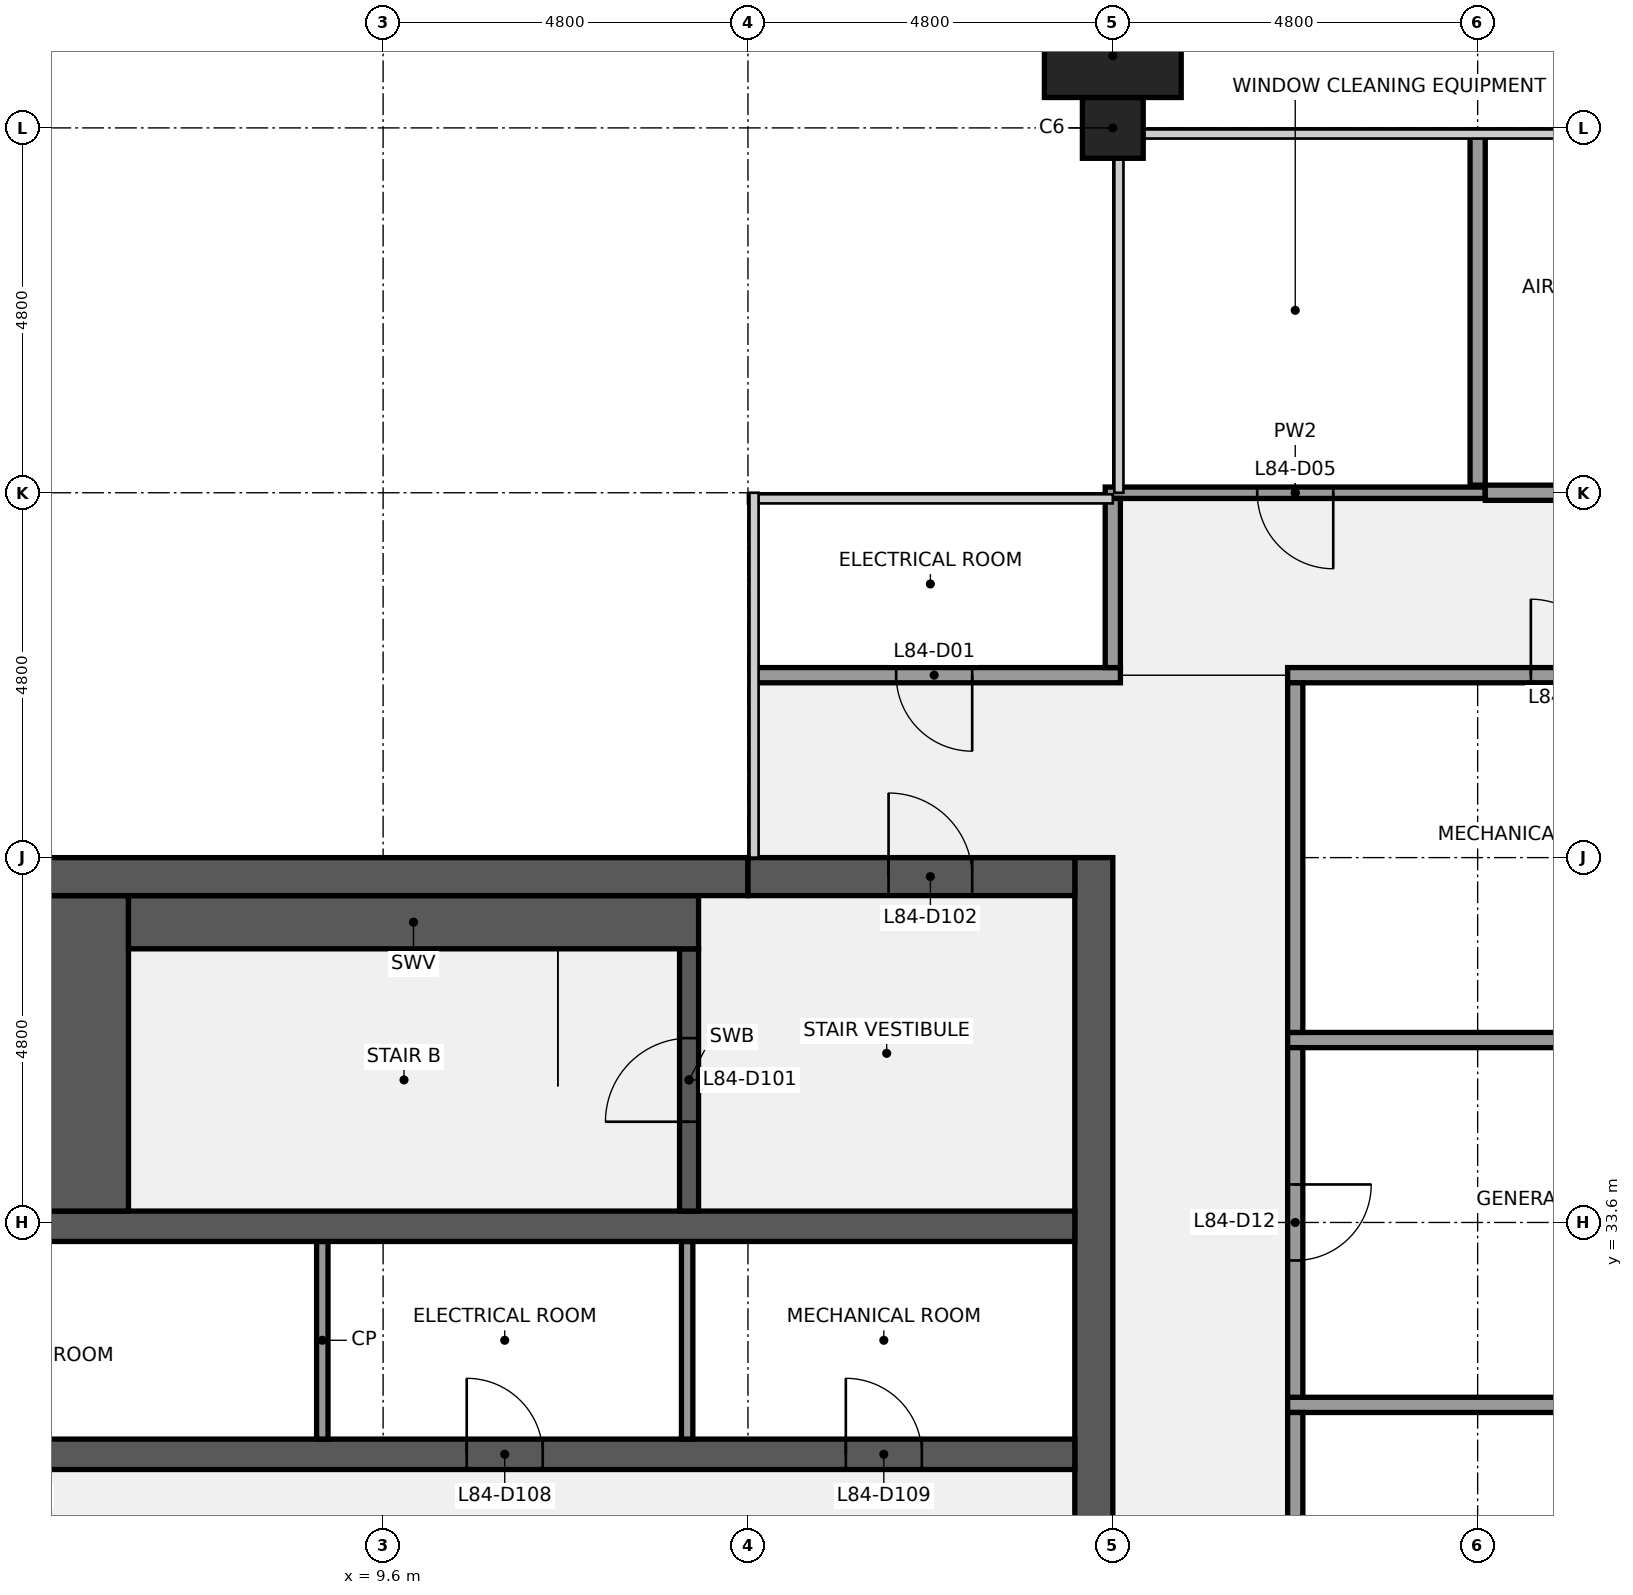
"""IFC4 building model, lengths in metres.
Left out: names, types, materials, properties, quantities, classifications, styles, units other than length and angle.
Written with IfcOpenShell. Run it as: python <this file> out.ifc"""

import sys

from ifc_helpers import new_model, si_unit, direction, frame, frame_2d, origin, origin_2d, place, context, subcontext, project, spatial, polyline, rectangle, outline, extrude, element, fill, save


model = new_model("IFC4")
c1 = context("Model", 3, precision=1e-05, world=origin(), true_north=direction((0.0, 1.0)))
c2 = subcontext(c1, "Body", "Model", "MODEL_VIEW")
j1 = project(units=[si_unit("LENGTHUNIT", "METRE"), si_unit("PLANEANGLEUNIT", "RADIAN")], contexts=[c1])
p1 = place(None, origin())
s1 = spatial("IfcSite", under=j1, at=p1, CompositionType="ELEMENT")
p2 = place(p1, origin())
s2 = spatial("IfcBuilding", under=s1, at=p2, CompositionType="ELEMENT")
p3 = place(p2, frame((0.0, 0.0, 374.3)))
s3 = spatial("IfcBuildingStorey", under=s2, at=p3, CompositionType="ELEMENT", Elevation=374.3)
p4 = place(p3, frame((19.2, 48.0, 0.0), z_axis=(0.0, 0.0, 1.0), x_axis=(1.0, 0.0, 0.0)))
e1 = element("IfcColumn", 1, at=p4, inside=s3, PredefinedType="COLUMN", context=c2, shape_type="SweptSolid", body=[
    extrude(rectangle(XDim=0.8, YDim=0.8, at=origin_2d()), origin(), (0.0, 0.0, 1.0), 4.0),
])
p5 = place(p3, frame((18.95, 38.4, 0.0), z_axis=(0.0, 0.0, 1.0), x_axis=(0.0, -1.0, 0.0)))
e2 = element("IfcWall", 2, at=p5, inside=s3, PredefinedType="SHEAR", context=c2, shape_type="SweptSolid", body=[
    extrude(outline(polyline([(0.0, 0.0), (24.276, 0.0), (24.277, 2.488), (0.0, 27.067), (0.0, 0.0)])), frame((0.0, 0.25, 0.0), z_axis=(0.0, -1.0, 0.0), x_axis=(1.0, 0.0, 0.0)), (0.0, 0.0, 1.0), 0.5),
])
p6 = place(p5, frame((18.3, 0.0, 0.0)))
e3 = element("IfcOpeningElement", 3, at=p6, cuts=e2, PredefinedType="OPENING", context=c2, shape_type="SweptSolid", body=[
    extrude(rectangle(XDim=1.8, YDim=2.1, at=frame_2d((0.9, 1.05))), frame((0.0, 0.26, 0.0), z_axis=(0.0, -1.0, 0.0), x_axis=(1.0, 0.0, 0.0)), (0.0, 0.0, 1.0), 0.52),
])
p7 = place(p5, frame((8.7, 0.0, 0.0)))
e4 = element("IfcOpeningElement", 4, at=p7, cuts=e2, PredefinedType="OPENING", context=c2, shape_type="SweptSolid", body=[
    extrude(rectangle(XDim=1.8, YDim=2.1, at=frame_2d((0.9, 1.05))), frame((0.0, 0.26, 0.0), z_axis=(0.0, -1.0, 0.0), x_axis=(1.0, 0.0, 0.0)), (0.0, 0.0, 1.0), 0.52),
])
p8 = place(p3, frame((0.5, 30.55, 0.0), z_axis=(0.0, 0.0, 1.0), x_axis=(1.0, 0.0, 0.0)))
e5 = element("IfcWall", 5, at=p8, inside=s3, PredefinedType="SHEAR", context=c2, shape_type="SweptSolid", body=[
    extrude(outline(polyline([(0.0, 0.0), (18.2, 0.0), (18.2, 19.119), (0.0, 19.119), (0.0, 0.0)])), frame((0.0, 0.2, 0.0), z_axis=(0.0, -1.0, 0.0), x_axis=(1.0, 0.0, 0.0)), (0.0, 0.0, 1.0), 0.4),
])
p9 = place(p8, frame((3.613, 0.0, 0.0)))
e6 = element("IfcOpeningElement", 6, at=p9, cuts=e5, PredefinedType="OPENING", context=c2, shape_type="SweptSolid", body=[
    extrude(rectangle(XDim=1.0, YDim=2.1, at=frame_2d((0.5, 1.05))), frame((0.0, 0.21, 0.0), z_axis=(0.0, -1.0, 0.0), x_axis=(1.0, 0.0, 0.0)), (0.0, 0.0, 1.0), 0.42),
])
p10 = place(p8, frame((10.2, 0.0, 0.0)))
e7 = element("IfcOpeningElement", 7, at=p10, cuts=e5, PredefinedType="OPENING", context=c2, shape_type="SweptSolid", body=[
    extrude(rectangle(XDim=1.0, YDim=2.1, at=frame_2d((0.5, 1.05))), frame((0.0, 0.21, 0.0), z_axis=(0.0, -1.0, 0.0), x_axis=(1.0, 0.0, 0.0)), (0.0, 0.0, 1.0), 0.42),
])
p11 = place(p8, frame((15.188, 0.0, 0.0)))
e8 = element("IfcOpeningElement", 8, at=p11, cuts=e5, PredefinedType="OPENING", context=c2, shape_type="SweptSolid", body=[
    extrude(rectangle(XDim=1.0, YDim=2.1, at=frame_2d((0.5, 1.05))), frame((0.0, 0.21, 0.0), z_axis=(0.0, -1.0, 0.0), x_axis=(1.0, 0.0, 0.0)), (0.0, 0.0, 1.0), 0.42),
])
for number, where, z_axis, x_axis in (
    (9, (8.8, 30.75, 0.0), (0.0, 0.0, 1.0), (0.0, 1.0, 0.0)),
    (10, (13.6, 30.75, 0.0), (0.0, 0.0, 1.0), (0.0, 1.0, 0.0)),
):
    element("IfcWall", number, at=place(p3, frame(where, z_axis=z_axis, x_axis=x_axis)), inside=s3, PredefinedType="PARTITIONING", context=c2, shape_type="SweptSolid", body=[
        extrude(outline(polyline([(0.0, 0.0), (2.6, 0.0), (2.6, 21.954), (0.0, 19.322), (0.0, 0.0)])), frame((0.0, 0.075, 0.0), z_axis=(0.0, -1.0, 0.0), x_axis=(1.0, 0.0, 0.0)), (0.0, 0.0, 1.0), 0.15),
    ])
p12 = place(p3, frame((0.5, 33.55, 0.0), z_axis=(0.0, 0.0, 1.0), x_axis=(1.0, 0.0, 0.0)))
e11 = element("IfcWall", 11, at=p12, inside=s3, PredefinedType="SHEAR", context=c2, shape_type="SweptSolid", body=[
    extrude(outline(polyline([(0.0, 0.0), (18.2, 0.0), (18.2, 22.157), (0.0, 22.157), (0.0, 0.0)])), frame((0.0, 0.2, 0.0), z_axis=(0.0, -1.0, 0.0), x_axis=(1.0, 0.0, 0.0)), (0.0, 0.0, 1.0), 0.4),
])
p13 = place(p3, frame((0.5, 35.825, 0.0), z_axis=(0.0, 0.0, 1.0), x_axis=(1.0, 0.0, 0.0)))
e12 = element("IfcWall", 12, at=p13, inside=s3, PredefinedType="SHEAR", context=c2, shape_type="SweptSolid", body=[
    extrude(outline(polyline([(0.0, 0.0), (5.75, 0.0), (5.75, 24.46), (0.0, 24.46), (0.0, 0.0)])), frame((0.0, 2.075, 0.0), z_axis=(0.0, -1.0, 0.0), x_axis=(1.0, 0.0, 0.0)), (0.0, 0.0, 1.0), 4.15),
])
p14 = place(p3, frame((13.625, 33.75, 0.0), z_axis=(0.0, 0.0, 1.0), x_axis=(0.0, 1.0, 0.0)))
e13 = element("IfcWall", 13, at=p14, inside=s3, PredefinedType="SHEAR", context=c2, shape_type="SweptSolid", body=[
    extrude(outline(polyline([(0.0, 0.0), (3.45, 0.0), (3.45, 25.853), (0.0, 22.359), (0.0, 0.0)])), frame((0.0, 0.125, 0.0), z_axis=(0.0, -1.0, 0.0), x_axis=(1.0, 0.0, 0.0)), (0.0, 0.0, 1.0), 0.25),
])
p15 = place(p14, frame((1.175, 0.0, 0.0)))
e14 = element("IfcOpeningElement", 14, at=p15, cuts=e13, PredefinedType="OPENING", context=c2, shape_type="SweptSolid", body=[
    extrude(rectangle(XDim=1.1, YDim=2.1, at=frame_2d((0.55, 1.05))), frame((0.0, 0.135, 0.0), z_axis=(0.0, -1.0, 0.0), x_axis=(1.0, 0.0, 0.0)), (0.0, 0.0, 1.0), 0.27),
])
p16 = place(p3, frame((6.25, 37.55, 0.0), z_axis=(0.0, 0.0, 1.0), x_axis=(1.0, 0.0, 0.0)))
e15 = element("IfcWall", 15, at=p16, inside=s3, PredefinedType="SHEAR", context=c2, shape_type="SweptSolid", body=[
    extrude(outline(polyline([(0.0, 0.0), (7.5, 0.0), (7.5, 26.207), (0.0, 26.207), (0.0, 0.0)])), frame((0.0, 0.35, 0.0), z_axis=(0.0, -1.0, 0.0), x_axis=(1.0, 0.0, 0.0)), (0.0, 0.0, 1.0), 0.7),
])
p17 = place(p3, frame((0.5, 38.15, 0.0), z_axis=(0.0, 0.0, 1.0), x_axis=(1.0, 0.0, 0.0)))
e16 = element("IfcWall", 16, at=p17, inside=s3, PredefinedType="SHEAR", context=c2, shape_type="SweptSolid", body=[
    extrude(outline(polyline([(0.0, 0.0), (13.9, 0.0), (13.9, 26.814), (0.0, 26.814), (0.0, 0.0)])), frame((0.0, 0.25, 0.0), z_axis=(0.0, -1.0, 0.0), x_axis=(1.0, 0.0, 0.0)), (0.0, 0.0, 1.0), 0.5),
])
p18 = place(p3, frame((14.4, 38.15, 0.0), z_axis=(0.0, 0.0, 1.0), x_axis=(1.0, 0.0, 0.0)))
e17 = element("IfcWall", 17, at=p18, inside=s3, PredefinedType="SHEAR", context=c2, shape_type="SweptSolid", body=[
    extrude(outline(polyline([(0.0, 0.0), (4.3, 0.0), (4.3, 26.814), (0.0, 26.814), (0.0, 0.0)])), frame((0.0, 0.25, 0.0), z_axis=(0.0, -1.0, 0.0), x_axis=(1.0, 0.0, 0.0)), (0.0, 0.0, 1.0), 0.5),
])
p19 = place(p18, frame((1.85, 0.0, 0.0)))
e18 = element("IfcOpeningElement", 18, at=p19, cuts=e17, PredefinedType="OPENING", context=c2, shape_type="SweptSolid", body=[
    extrude(rectangle(XDim=1.1, YDim=2.1, at=frame_2d((0.55, 1.05))), frame((0.0, 0.26, 0.0), z_axis=(0.0, -1.0, 0.0), x_axis=(1.0, 0.0, 0.0)), (0.0, 0.0, 1.0), 0.52),
])
for number, where, z_axis, x_axis in (
    (19, (21.5, 31.2, 0.0), (0.0, 0.0, 1.0), (1.0, 0.0, 0.0)),
    (20, (21.5, 36.0, 0.0), (0.0, 0.0, 1.0), (1.0, 0.0, 0.0)),
):
    element("IfcWall", number, at=place(p3, frame(where, z_axis=z_axis, x_axis=x_axis)), inside=s3, PredefinedType="PARTITIONING", context=c2, shape_type="SweptSolid", body=[
        extrude(rectangle(XDim=14.6, YDim=0.2, at=frame_2d((7.3, 0.0))), origin(), (0.0, 0.0, 1.0), 2.9),
    ])
p20 = place(p3, frame((14.5, 40.8, 0.0), z_axis=(0.0, 0.0, 1.0), x_axis=(1.0, 0.0, 0.0)))
e21 = element("IfcWall", 21, at=p20, inside=s3, PredefinedType="PARTITIONING", context=c2, shape_type="SweptSolid", body=[
    extrude(rectangle(XDim=4.8, YDim=0.2, at=frame_2d((2.4, 0.0))), origin(), (0.0, 0.0, 1.0), 2.9),
])
p21 = place(p20, frame((1.85, 0.0, 0.0)))
e22 = element("IfcOpeningElement", 22, at=p21, cuts=e21, PredefinedType="OPENING", context=c2, shape_type="SweptSolid", body=[
    extrude(rectangle(XDim=1.0, YDim=2.1, at=frame_2d((0.5, 1.05))), frame((0.0, 0.11, 0.0), z_axis=(0.0, -1.0, 0.0), x_axis=(1.0, 0.0, 0.0)), (0.0, 0.0, 1.0), 0.22),
])
p22 = place(p3, frame((21.5, 40.8, 0.0), z_axis=(0.0, 0.0, 1.0), x_axis=(1.0, 0.0, 0.0)))
e23 = element("IfcWall", 23, at=p22, inside=s3, PredefinedType="PARTITIONING", context=c2, shape_type="SweptSolid", body=[
    extrude(rectangle(XDim=14.6, YDim=0.2, at=frame_2d((7.3, 0.0))), origin(), (0.0, 0.0, 1.0), 2.9),
])
p23 = place(p22, frame((3.2, 0.0, 0.0)))
e24 = element("IfcOpeningElement", 24, at=p23, cuts=e23, PredefinedType="OPENING", context=c2, shape_type="SweptSolid", body=[
    extrude(rectangle(XDim=1.0, YDim=2.1, at=frame_2d((0.5, 1.05))), frame((0.0, 0.11, 0.0), z_axis=(0.0, -1.0, 0.0), x_axis=(1.0, 0.0, 0.0)), (0.0, 0.0, 1.0), 0.22),
])
p24 = place(p22, frame((10.4, 0.0, 0.0)))
e25 = element("IfcOpeningElement", 25, at=p24, cuts=e23, PredefinedType="OPENING", context=c2, shape_type="SweptSolid", body=[
    extrude(rectangle(XDim=1.0, YDim=2.1, at=frame_2d((0.5, 1.05))), frame((0.0, 0.11, 0.0), z_axis=(0.0, -1.0, 0.0), x_axis=(1.0, 0.0, 0.0)), (0.0, 0.0, 1.0), 0.22),
])
p25 = place(p3, frame((19.1, 43.2, 0.0), z_axis=(0.0, 0.0, 1.0), x_axis=(1.0, 0.0, 0.0)))
e26 = element("IfcWall", 26, at=p25, inside=s3, PredefinedType="PARTITIONING", context=c2, shape_type="SweptSolid", body=[
    extrude(rectangle(XDim=5.0, YDim=0.15, at=frame_2d((2.5, 0.0))), origin(), (0.0, 0.0, 1.0), 2.9),
])
p26 = place(p25, frame((2.0, 0.0, 0.0)))
e27 = element("IfcOpeningElement", 27, at=p26, cuts=e26, PredefinedType="OPENING", context=c2, shape_type="SweptSolid", body=[
    extrude(rectangle(XDim=1.0, YDim=2.1, at=frame_2d((0.5, 1.05))), frame((0.0, 0.085, 0.0), z_axis=(0.0, -1.0, 0.0), x_axis=(1.0, 0.0, 0.0)), (0.0, 0.0, 1.0), 0.17),
])
p27 = place(p3, frame((24.1, 43.2, 0.0), z_axis=(0.0, 0.0, 1.0), x_axis=(1.0, 0.0, 0.0)))
e28 = element("IfcWall", 28, at=p27, inside=s3, PredefinedType="PARTITIONING", context=c2, shape_type="SweptSolid", body=[
    extrude(rectangle(XDim=14.4, YDim=0.2, at=frame_2d((7.2, 0.0))), origin(), (0.0, 0.0, 1.0), 2.9),
])
p28 = place(p27, frame((1.85, 0.0, 0.0)))
e29 = element("IfcOpeningElement", 29, at=p28, cuts=e28, PredefinedType="OPENING", context=c2, shape_type="SweptSolid", body=[
    extrude(rectangle(XDim=1.0, YDim=2.1, at=frame_2d((0.5, 1.05))), frame((0.0, 0.11, 0.0), z_axis=(0.0, -1.0, 0.0), x_axis=(1.0, 0.0, 0.0)), (0.0, 0.0, 1.0), 0.22),
])
p29 = place(p27, frame((6.6, 0.0, 0.0)))
e30 = element("IfcOpeningElement", 30, at=p29, cuts=e28, PredefinedType="OPENING", context=c2, shape_type="SweptSolid", body=[
    extrude(rectangle(XDim=1.0, YDim=2.1, at=frame_2d((0.5, 1.05))), frame((0.0, 0.11, 0.0), z_axis=(0.0, -1.0, 0.0), x_axis=(1.0, 0.0, 0.0)), (0.0, 0.0, 1.0), 0.22),
])
p30 = place(p27, frame((11.4, 0.0, 0.0)))
e31 = element("IfcOpeningElement", 31, at=p30, cuts=e28, PredefinedType="OPENING", context=c2, shape_type="SweptSolid", body=[
    extrude(rectangle(XDim=1.0, YDim=2.1, at=frame_2d((0.5, 1.05))), frame((0.0, 0.11, 0.0), z_axis=(0.0, -1.0, 0.0), x_axis=(1.0, 0.0, 0.0)), (0.0, 0.0, 1.0), 0.22),
])
p31 = place(p3, frame((19.2, 40.9, 0.0), z_axis=(0.0, 0.0, 1.0), x_axis=(0.0, 1.0, 0.0)))
e32 = element("IfcWall", 32, at=p31, inside=s3, PredefinedType="PARTITIONING", context=c2, shape_type="SweptSolid", body=[
    extrude(rectangle(XDim=2.225, YDim=0.2, at=frame_2d((1.113, 0.0))), origin(), (0.0, 0.0, 1.0), 2.9),
])
p32 = place(p3, frame((21.6, 24.1, 0.0), z_axis=(0.0, 0.0, 1.0), x_axis=(0.0, 1.0, 0.0)))
e33 = element("IfcWall", 33, at=p32, inside=s3, PredefinedType="PARTITIONING", context=c2, shape_type="SweptSolid", body=[
    extrude(rectangle(XDim=7.0, YDim=0.2, at=frame_2d((3.5, 0.0))), origin(), (0.0, 0.0, 1.0), 2.9),
])
p33 = place(p32, frame((3.0, 0.0, 0.0)))
e34 = element("IfcOpeningElement", 34, at=p33, cuts=e33, PredefinedType="OPENING", context=c2, shape_type="SweptSolid", body=[
    extrude(rectangle(XDim=1.0, YDim=2.1, at=frame_2d((0.5, 1.05))), frame((0.0, 0.11, 0.0), z_axis=(0.0, -1.0, 0.0), x_axis=(1.0, 0.0, 0.0)), (0.0, 0.0, 1.0), 0.22),
])
p34 = place(p3, frame((21.6, 31.3, 0.0), z_axis=(0.0, 0.0, 1.0), x_axis=(0.0, 1.0, 0.0)))
e35 = element("IfcWall", 35, at=p34, inside=s3, PredefinedType="PARTITIONING", context=c2, shape_type="SweptSolid", body=[
    extrude(rectangle(XDim=4.6, YDim=0.2, at=frame_2d((2.3, 0.0))), origin(), (0.0, 0.0, 1.0), 2.9),
])
p35 = place(p34, frame((1.8, 0.0, 0.0)))
e36 = element("IfcOpeningElement", 36, at=p35, cuts=e35, PredefinedType="OPENING", context=c2, shape_type="SweptSolid", body=[
    extrude(rectangle(XDim=1.0, YDim=2.1, at=frame_2d((0.5, 1.05))), frame((0.0, 0.11, 0.0), z_axis=(0.0, -1.0, 0.0), x_axis=(1.0, 0.0, 0.0)), (0.0, 0.0, 1.0), 0.22),
])
for number, where, z_axis, x_axis in (
    (37, (21.6, 36.1, 0.0), (0.0, 0.0, 1.0), (0.0, 1.0, 0.0)),
    (38, (24.0, 43.3, 0.0), (0.0, 0.0, 1.0), (0.0, 1.0, 0.0)),
):
    element("IfcWall", number, at=place(p3, frame(where, z_axis=z_axis, x_axis=x_axis)), inside=s3, PredefinedType="PARTITIONING", context=c2, shape_type="SweptSolid", body=[
        extrude(rectangle(XDim=4.6, YDim=0.2, at=frame_2d((2.3, 0.0))), origin(), (0.0, 0.0, 1.0), 2.9),
    ])
p36 = place(p3, frame((19.2, 48.95, 0.0), z_axis=(0.0, 0.0, 1.0), x_axis=(1.0, 0.0, 0.0)))
e39 = element("IfcColumn", 39, at=p36, inside=s3, PredefinedType="PILASTER", context=c2, shape_type="SweptSolid", body=[
    extrude(rectangle(XDim=1.8, YDim=1.1, at=origin_2d()), origin(), (0.0, 0.0, 1.0), 4.0),
])
p37 = place(p15, origin())
e40 = element("IfcDoor", 40, at=p37, inside=s3, OperationType="SINGLE_SWING_LEFT", PredefinedType="DOOR", context=c2, shape_type="SweptSolid", body=[
    extrude(rectangle(XDim=1.1, YDim=2.1, at=frame_2d((0.55, 1.05))), frame((0.0, 0.025, 0.0), z_axis=(0.0, -1.0, 0.0), x_axis=(1.0, 0.0, 0.0)), (0.0, 0.0, 1.0), 0.05),
])
fill(e14, e40)
p38 = place(p19, origin())
e41 = element("IfcDoor", 41, at=p38, inside=s3, OperationType="SINGLE_SWING_LEFT", PredefinedType="DOOR", context=c2, shape_type="SweptSolid", body=[
    extrude(rectangle(XDim=1.1, YDim=2.1, at=frame_2d((0.55, 1.05))), frame((0.0, 0.025, 0.0), z_axis=(0.0, -1.0, 0.0), x_axis=(1.0, 0.0, 0.0)), (0.0, 0.0, 1.0), 0.05),
])
fill(e18, e41)
p39 = place(p10, origin())
e42 = element("IfcDoor", 42, at=p39, inside=s3, OperationType="SINGLE_SWING_LEFT", PredefinedType="DOOR", context=c2, shape_type="SweptSolid", body=[
    extrude(rectangle(XDim=1.0, YDim=2.1, at=frame_2d((0.5, 1.05))), frame((0.0, 0.025, 0.0), z_axis=(0.0, -1.0, 0.0), x_axis=(1.0, 0.0, 0.0)), (0.0, 0.0, 1.0), 0.05),
])
fill(e7, e42)
p40 = place(p11, origin())
e43 = element("IfcDoor", 43, at=p40, inside=s3, OperationType="SINGLE_SWING_LEFT", PredefinedType="DOOR", context=c2, shape_type="SweptSolid", body=[
    extrude(rectangle(XDim=1.0, YDim=2.1, at=frame_2d((0.5, 1.05))), frame((0.0, 0.025, 0.0), z_axis=(0.0, -1.0, 0.0), x_axis=(1.0, 0.0, 0.0)), (0.0, 0.0, 1.0), 0.05),
])
fill(e8, e43)
p41 = place(p21, origin())
e44 = element("IfcDoor", 44, at=p41, inside=s3, OperationType="SINGLE_SWING_RIGHT", PredefinedType="DOOR", context=c2, shape_type="SweptSolid", body=[
    extrude(rectangle(XDim=1.0, YDim=2.1, at=frame_2d((0.5, 1.05))), frame((0.0, 0.025, 0.0), z_axis=(0.0, -1.0, 0.0), x_axis=(1.0, 0.0, 0.0)), (0.0, 0.0, 1.0), 0.05),
])
fill(e22, e44)
p42 = place(p23, origin())
e45 = element("IfcDoor", 45, at=p42, inside=s3, OperationType="SINGLE_SWING_LEFT", PredefinedType="DOOR", context=c2, shape_type="SweptSolid", body=[
    extrude(rectangle(XDim=1.0, YDim=2.1, at=frame_2d((0.5, 1.05))), frame((0.0, 0.025, 0.0), z_axis=(0.0, -1.0, 0.0), x_axis=(1.0, 0.0, 0.0)), (0.0, 0.0, 1.0), 0.05),
])
fill(e24, e45)
p43 = place(p26, origin())
e46 = element("IfcDoor", 46, at=p43, inside=s3, OperationType="SINGLE_SWING_RIGHT", PredefinedType="DOOR", context=c2, shape_type="SweptSolid", body=[
    extrude(rectangle(XDim=1.0, YDim=2.1, at=frame_2d((0.5, 1.05))), frame((0.0, 0.025, 0.0), z_axis=(0.0, -1.0, 0.0), x_axis=(1.0, 0.0, 0.0)), (0.0, 0.0, 1.0), 0.05),
])
fill(e27, e46)
p44 = place(p35, origin())
e47 = element("IfcDoor", 47, at=p44, inside=s3, OperationType="SINGLE_SWING_RIGHT", PredefinedType="DOOR", context=c2, shape_type="SweptSolid", body=[
    extrude(rectangle(XDim=1.0, YDim=2.1, at=frame_2d((0.5, 1.05))), frame((0.0, 0.025, 0.0), z_axis=(0.0, -1.0, 0.0), x_axis=(1.0, 0.0, 0.0)), (0.0, 0.0, 1.0), 0.05),
])
fill(e36, e47)
save(model, sys.argv[1])
